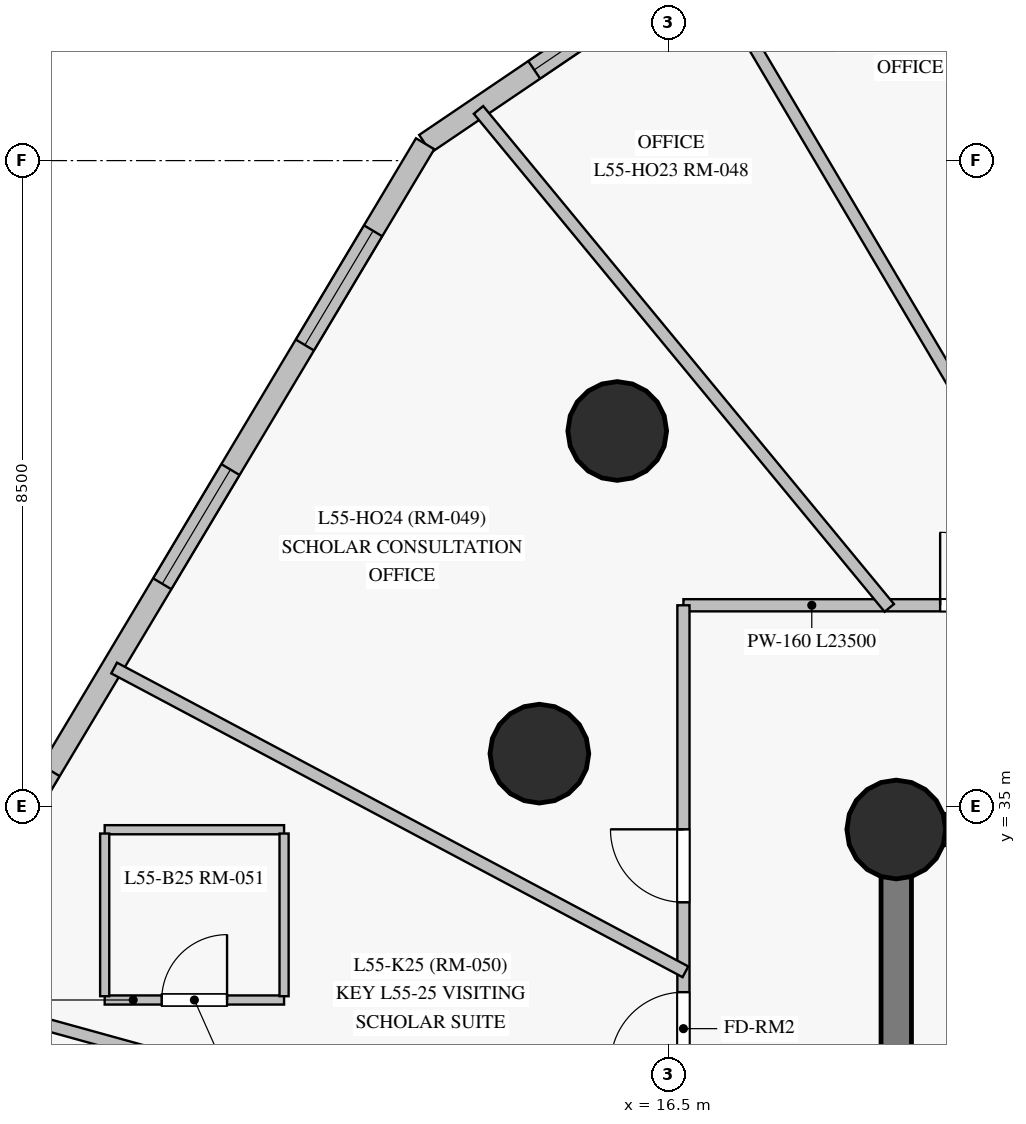
"""IFC4 building model, lengths in metres.
Left out: names, types, materials, properties, quantities, classifications, styles, units other than length and angle.
Written with IfcOpenShell. Run it as: python <this file> out.ifc"""

import sys

from ifc_helpers import new_model, si_unit, direction, frame, frame_2d, origin, origin_with_axes, origin_2d, place, context, subcontext, project, spatial, rectangle, circle, extrude, source, transform, mapped, element, fill, save


model = new_model("IFC4")
c1 = context("Model", 3, precision=1e-05, world=origin(), true_north=direction((0.0, 1.0)))
c2 = subcontext(c1, "Body", "Model", "MODEL_VIEW")
j1 = project(units=[si_unit("LENGTHUNIT", "METRE"), si_unit("PLANEANGLEUNIT", "RADIAN")], contexts=[c1])
p1 = place(None, origin())
s1 = spatial("IfcSite", under=j1, at=p1, CompositionType="ELEMENT")
p2 = place(p1, origin())
s2 = spatial("IfcBuilding", under=s1, at=p2, CompositionType="ELEMENT")
p3 = place(p2, frame((0.0, 0.0, 190.1)))
s3 = spatial("IfcBuildingStorey", under=s2, at=p3, CompositionType="ELEMENT", Elevation=190.1)
p4 = place(p3, frame((26.55, 34.7, 0.0), z_axis=(0.0, 0.0, 1.0), x_axis=(-1.0, 0.0, 0.0)))
e1 = element("IfcWall", 1, at=p4, inside=s3, PredefinedType="SHEAR", context=c2, shape_type="SweptSolid", body=[
    extrude(rectangle(XDim=7.05, YDim=0.4, at=frame_2d((3.525, 0.0))), origin(), (0.0, 0.0, 1.0), 2.825),
])
p5 = place(p4, frame((4.25, 0.0, 0.0)))
e2 = element("IfcOpeningElement", 2, at=p5, cuts=e1, PredefinedType="OPENING", context=c2, shape_type="SweptSolid", body=[
    extrude(rectangle(XDim=1.1, YDim=2.15, at=frame_2d((0.55, 1.075))), frame((0.0, 0.21, 0.0), z_axis=(0.0, -1.0, 0.0), x_axis=(1.0, 0.0, 0.0)), (0.0, 0.0, 1.0), 0.42),
])
p6 = place(p3, frame((19.5, 34.7, 0.0), z_axis=(0.0, 0.0, 1.0), x_axis=(0.0, -1.0, 0.0)))
e3 = element("IfcWall", 3, at=p6, inside=s3, PredefinedType="SHEAR", context=c2, shape_type="SweptSolid", body=[
    extrude(rectangle(XDim=16.4, YDim=0.4, at=frame_2d((8.2, 0.0))), origin(), (0.0, 0.0, 1.0), 2.825),
])
p7 = place(p6, frame((3.1, 0.0, 0.0)))
e4 = element("IfcOpeningElement", 4, at=p7, cuts=e3, PredefinedType="OPENING", context=c2, shape_type="SweptSolid", body=[
    extrude(rectangle(XDim=1.1, YDim=2.15, at=frame_2d((0.55, 1.075))), frame((0.0, 0.21, 0.0), z_axis=(0.0, -1.0, 0.0), x_axis=(1.0, 0.0, 0.0)), (0.0, 0.0, 1.0), 0.42),
])
m1 = source(origin_with_axes(), c2, "Body", "SweptSolid", [
    extrude(circle(Radius=0.65, at=origin_2d()), origin(), (0.0, 0.0, 1.0), 3.05),
])
for number, where, z_axis, x_axis in (
    (5, (19.5, 34.7, 0.0), (0.0, 0.0, 1.0), (1.0, 0.0, 0.0)),
    (6, (15.829, 39.943, 0.0), (0.0, 0.0, 1.0), (1.0, 0.0, 0.0)),
    (7, (14.805, 35.698, 0.0), (0.0, 0.0, 1.0), (1.0, 0.0, 0.0)),
):
    element("IfcColumn", number, at=place(p3, frame(where, z_axis=z_axis, x_axis=x_axis)), inside=s3, PredefinedType="COLUMN", context=c2, shape_type="MappedRepresentation", body=[
        mapped(m1, transform((0.0, 0.0, 0.0), scale=1.0)),
    ])
p8 = place(p3, frame((21.78, 49.462, 0.0), z_axis=(0.0, 0.0, 1.0), x_axis=(-0.82803760376, -0.560672566441, 0.0)))
e8 = element("IfcWall", 8, at=p8, inside=s3, PredefinedType="SOLIDWALL", context=c2, shape_type="SweptSolid", body=[
    extrude(rectangle(XDim=10.239, YDim=0.28, at=frame_2d((5.12, 0.0))), origin(), (0.0, 0.0, 1.0), 2.825),
])
p9 = place(p8, frame((2.764, 0.0, 0.85)))
e9 = element("IfcOpeningElement", 9, at=p9, cuts=e8, PredefinedType="OPENING", context=c2, shape_type="SweptSolid", body=[
    extrude(rectangle(XDim=1.75, YDim=1.65, at=frame_2d((0.875, 0.825))), frame((0.0, 0.15, 0.0), z_axis=(0.0, -1.0, 0.0), x_axis=(1.0, 0.0, 0.0)), (0.0, 0.0, 1.0), 0.3),
])
p10 = place(p8, frame((6.756, 0.0, 0.85)))
e10 = element("IfcOpeningElement", 10, at=p10, cuts=e8, PredefinedType="OPENING", context=c2, shape_type="SweptSolid", body=[
    extrude(rectangle(XDim=1.75, YDim=1.65, at=frame_2d((0.875, 0.825))), frame((0.0, 0.15, 0.0), z_axis=(0.0, -1.0, 0.0), x_axis=(1.0, 0.0, 0.0)), (0.0, 0.0, 1.0), 0.3),
])
p11 = place(p3, frame((13.302, 43.722, 0.0), z_axis=(0.0, 0.0, 1.0), x_axis=(-0.512903816994, -0.858446081308, 0.0)))
e11 = element("IfcWall", 11, at=p11, inside=s3, PredefinedType="SOLIDWALL", context=c2, shape_type="SweptSolid", body=[
    extrude(rectangle(XDim=14.194, YDim=0.28, at=frame_2d((7.097, 0.0))), origin(), (0.0, 0.0, 1.0), 2.825),
])
p12 = place(p11, frame((1.334, 0.0, 0.85)))
e12 = element("IfcOpeningElement", 12, at=p12, cuts=e11, PredefinedType="OPENING", context=c2, shape_type="SweptSolid", body=[
    extrude(rectangle(XDim=1.75, YDim=1.65, at=frame_2d((0.875, 0.825))), frame((0.0, 0.15, 0.0), z_axis=(0.0, -1.0, 0.0), x_axis=(1.0, 0.0, 0.0)), (0.0, 0.0, 1.0), 0.3),
])
p13 = place(p11, frame((4.993, 0.0, 0.85)))
e13 = element("IfcOpeningElement", 13, at=p13, cuts=e11, PredefinedType="OPENING", context=c2, shape_type="SweptSolid", body=[
    extrude(rectangle(XDim=1.75, YDim=1.65, at=frame_2d((0.875, 0.825))), frame((0.0, 0.15, 0.0), z_axis=(0.0, -1.0, 0.0), x_axis=(1.0, 0.0, 0.0)), (0.0, 0.0, 1.0), 0.3),
])
p14 = place(p11, frame((9.608, 0.0, 0.85)))
e14 = element("IfcOpeningElement", 14, at=p14, cuts=e11, PredefinedType="OPENING", context=c2, shape_type="SweptSolid", body=[
    extrude(rectangle(XDim=1.75, YDim=1.65, at=frame_2d((0.875, 0.825))), frame((0.0, 0.15, 0.0), z_axis=(0.0, -1.0, 0.0), x_axis=(1.0, 0.0, 0.0)), (0.0, 0.0, 1.0), 0.3),
])
p15 = place(p3, frame((16.7, 37.65, 0.0), z_axis=(0.0, 0.0, 1.0), x_axis=(1.0, 0.0, 0.0)))
e15 = element("IfcWall", 15, at=p15, inside=s3, PredefinedType="PARTITIONING", context=c2, shape_type="SweptSolid", body=[
    extrude(rectangle(XDim=23.5, YDim=0.16, at=frame_2d((11.75, 0.0))), origin(), (0.0, 0.0, 1.0), 2.375),
])
p16 = place(p15, frame((20.285, 0.0, 0.0)))
e16 = element("IfcOpeningElement", 16, at=p16, cuts=e15, PredefinedType="OPENING", context=c2, shape_type="SweptSolid", body=[
    extrude(rectangle(XDim=0.96, YDim=2.15, at=frame_2d((0.48, 1.075))), frame((0.0, 0.09, 0.0), z_axis=(0.0, -1.0, 0.0), x_axis=(1.0, 0.0, 0.0)), (0.0, 0.0, 1.0), 0.18),
])
p17 = place(p15, frame((16.66, 0.0, 0.0)))
e17 = element("IfcOpeningElement", 17, at=p17, cuts=e15, PredefinedType="OPENING", context=c2, shape_type="SweptSolid", body=[
    extrude(rectangle(XDim=0.96, YDim=2.15, at=frame_2d((0.48, 1.075))), frame((0.0, 0.09, 0.0), z_axis=(0.0, -1.0, 0.0), x_axis=(1.0, 0.0, 0.0)), (0.0, 0.0, 1.0), 0.18),
])
p18 = place(p15, frame((13.863, 0.0, 0.0)))
e18 = element("IfcOpeningElement", 18, at=p18, cuts=e15, PredefinedType="OPENING", context=c2, shape_type="SweptSolid", body=[
    extrude(rectangle(XDim=0.96, YDim=2.15, at=frame_2d((0.48, 1.075))), frame((0.0, 0.09, 0.0), z_axis=(0.0, -1.0, 0.0), x_axis=(1.0, 0.0, 0.0)), (0.0, 0.0, 1.0), 0.18),
])
p19 = place(p15, frame((11.965, 0.0, 0.0)))
e19 = element("IfcOpeningElement", 19, at=p19, cuts=e15, PredefinedType="OPENING", context=c2, shape_type="SweptSolid", body=[
    extrude(rectangle(XDim=0.96, YDim=2.15, at=frame_2d((0.48, 1.075))), frame((0.0, 0.09, 0.0), z_axis=(0.0, -1.0, 0.0), x_axis=(1.0, 0.0, 0.0)), (0.0, 0.0, 1.0), 0.18),
])
p20 = place(p15, frame((10.215, 0.0, 0.0)))
e20 = element("IfcOpeningElement", 20, at=p20, cuts=e15, PredefinedType="OPENING", context=c2, shape_type="SweptSolid", body=[
    extrude(rectangle(XDim=0.96, YDim=2.15, at=frame_2d((0.48, 1.075))), frame((0.0, 0.09, 0.0), z_axis=(0.0, -1.0, 0.0), x_axis=(1.0, 0.0, 0.0)), (0.0, 0.0, 1.0), 0.18),
])
p21 = place(p15, frame((8.14, 0.0, 0.0)))
e21 = element("IfcOpeningElement", 21, at=p21, cuts=e15, PredefinedType="OPENING", context=c2, shape_type="SweptSolid", body=[
    extrude(rectangle(XDim=0.96, YDim=2.15, at=frame_2d((0.48, 1.075))), frame((0.0, 0.09, 0.0), z_axis=(0.0, -1.0, 0.0), x_axis=(1.0, 0.0, 0.0)), (0.0, 0.0, 1.0), 0.18),
])
p22 = place(p15, frame((5.54, 0.0, 0.0)))
e22 = element("IfcOpeningElement", 22, at=p22, cuts=e15, PredefinedType="OPENING", context=c2, shape_type="SweptSolid", body=[
    extrude(rectangle(XDim=0.96, YDim=2.15, at=frame_2d((0.48, 1.075))), frame((0.0, 0.09, 0.0), z_axis=(0.0, -1.0, 0.0), x_axis=(1.0, 0.0, 0.0)), (0.0, 0.0, 1.0), 0.18),
])
p23 = place(p15, frame((3.377, 0.0, 0.0)))
e23 = element("IfcOpeningElement", 23, at=p23, cuts=e15, PredefinedType="OPENING", context=c2, shape_type="SweptSolid", body=[
    extrude(rectangle(XDim=0.96, YDim=2.15, at=frame_2d((0.48, 1.075))), frame((0.0, 0.09, 0.0), z_axis=(0.0, -1.0, 0.0), x_axis=(1.0, 0.0, 0.0)), (0.0, 0.0, 1.0), 0.18),
])
p24 = place(p3, frame((16.7, 15.35, 0.0), z_axis=(0.0, 0.0, 1.0), x_axis=(0.0, 1.0, 0.0)))
e24 = element("IfcWall", 24, at=p24, inside=s3, PredefinedType="PARTITIONING", context=c2, shape_type="SweptSolid", body=[
    extrude(rectangle(XDim=22.3, YDim=0.16, at=frame_2d((11.15, 0.0))), origin(), (0.0, 0.0, 1.0), 2.275),
])
p25 = place(p24, frame((16.25, 0.0, 0.0)))
e25 = element("IfcOpeningElement", 25, at=p25, cuts=e24, PredefinedType="OPENING", context=c2, shape_type="SweptSolid", body=[
    extrude(rectangle(XDim=0.96, YDim=2.15, at=frame_2d((0.48, 1.075))), frame((0.0, 0.09, 0.0), z_axis=(0.0, -1.0, 0.0), x_axis=(1.0, 0.0, 0.0)), (0.0, 0.0, 1.0), 0.18),
])
p26 = place(p24, frame((11.065, 0.0, 0.0)))
e26 = element("IfcOpeningElement", 26, at=p26, cuts=e24, PredefinedType="OPENING", context=c2, shape_type="SweptSolid", body=[
    extrude(rectangle(XDim=0.96, YDim=2.15, at=frame_2d((0.48, 1.075))), frame((0.0, 0.09, 0.0), z_axis=(0.0, -1.0, 0.0), x_axis=(1.0, 0.0, 0.0)), (0.0, 0.0, 1.0), 0.18),
])
p27 = place(p24, frame((7.33, 0.0, 0.0)))
e27 = element("IfcOpeningElement", 27, at=p27, cuts=e24, PredefinedType="OPENING", context=c2, shape_type="SweptSolid", body=[
    extrude(rectangle(XDim=0.96, YDim=2.15, at=frame_2d((0.48, 1.075))), frame((0.0, 0.09, 0.0), z_axis=(0.0, -1.0, 0.0), x_axis=(1.0, 0.0, 0.0)), (0.0, 0.0, 1.0), 0.18),
])
p28 = place(p24, frame((5.1, 0.0, 0.0)))
e28 = element("IfcOpeningElement", 28, at=p28, cuts=e24, PredefinedType="OPENING", context=c2, shape_type="SweptSolid", body=[
    extrude(rectangle(XDim=0.96, YDim=2.15, at=frame_2d((0.48, 1.075))), frame((0.0, 0.09, 0.0), z_axis=(0.0, -1.0, 0.0), x_axis=(1.0, 0.0, 0.0)), (0.0, 0.0, 1.0), 0.18),
])
p29 = place(p24, frame((18.392, 0.0, 0.0)))
e29 = element("IfcOpeningElement", 29, at=p29, cuts=e24, PredefinedType="OPENING", context=c2, shape_type="SweptSolid", body=[
    extrude(rectangle(XDim=0.96, YDim=2.15, at=frame_2d((0.48, 1.075))), frame((0.0, 0.09, 0.0), z_axis=(0.0, -1.0, 0.0), x_axis=(1.0, 0.0, 0.0)), (0.0, 0.0, 1.0), 0.18),
])
p30 = place(p3, frame((16.743, 29.807, 0.0), z_axis=(0.0, 0.0, 1.0), x_axis=(-0.963952503932, 0.266074369611, 0.0)))
e30 = element("IfcWall", 30, at=p30, inside=s3, PredefinedType="PARTITIONING", context=c2, shape_type="SweptSolid", body=[
    extrude(rectangle(XDim=10.44, YDim=0.16, at=frame_2d((5.22, 0.0))), origin(), (0.0, 0.0, 1.0), 2.825),
])
p31 = place(p3, frame((22.0, 37.611, 0.0), z_axis=(0.0, 0.0, 1.0), x_axis=(-0.508928084583, 0.8608090408, 0.0)))
e31 = element("IfcWall", 31, at=p31, inside=s3, PredefinedType="PARTITIONING", context=c2, shape_type="SweptSolid", body=[
    extrude(rectangle(XDim=9.931, YDim=0.16, at=frame_2d((4.965, 0.0))), origin(), (0.0, 0.0, 1.0), 2.825),
])
p32 = place(p3, frame((16.727, 32.828, 0.0), z_axis=(0.0, 0.0, 1.0), x_axis=(-0.882944481413, 0.469477414517, 0.0)))
e32 = element("IfcWall", 32, at=p32, inside=s3, PredefinedType="PARTITIONING", context=c2, shape_type="SweptSolid", body=[
    extrude(rectangle(XDim=8.513, YDim=0.16, at=frame_2d((4.256, 0.0))), origin(), (0.0, 0.0, 1.0), 2.825),
])
p33 = place(p3, frame((19.408, 37.615, 0.0), z_axis=(0.0, 0.0, 1.0), x_axis=(-0.636333777541, 0.771413847141, 0.0)))
e33 = element("IfcWall", 33, at=p33, inside=s3, PredefinedType="PARTITIONING", context=c2, shape_type="SweptSolid", body=[
    extrude(rectangle(XDim=8.493, YDim=0.16, at=frame_2d((4.247, 0.0))), origin(), (0.0, 0.0, 1.0), 2.825),
])
p34 = place(p3, frame((9.086, 32.457, 0.0), z_axis=(0.0, 0.0, 1.0), x_axis=(1.0, 0.0, 0.0)))
e34 = element("IfcWall", 34, at=p34, inside=s3, PredefinedType="PARTITIONING", context=c2, shape_type="SweptSolid", body=[
    extrude(rectangle(XDim=2.36, YDim=0.12, at=frame_2d((1.18, 0.0))), origin(), (0.0, 0.0, 1.0), 2.825),
])
p35 = place(p34, frame((0.75, 0.0, 0.0)))
e35 = element("IfcOpeningElement", 35, at=p35, cuts=e34, PredefinedType="OPENING", context=c2, shape_type="SweptSolid", body=[
    extrude(rectangle(XDim=0.86, YDim=2.04, at=frame_2d((0.43, 1.02))), frame((0.0, 0.07, 0.0), z_axis=(0.0, -1.0, 0.0), x_axis=(1.0, 0.0, 0.0)), (0.0, 0.0, 1.0), 0.14),
])
p36 = place(p3, frame((11.446, 34.697, 0.0), z_axis=(0.0, 0.0, 1.0), x_axis=(-1.0, 0.0, 0.0)))
e36 = element("IfcWall", 36, at=p36, inside=s3, PredefinedType="PARTITIONING", context=c2, shape_type="SweptSolid", body=[
    extrude(rectangle(XDim=2.36, YDim=0.12, at=frame_2d((1.18, 0.0))), origin(), (0.0, 0.0, 1.0), 2.825),
])
for number, where, z_axis, x_axis in (
    (37, (11.446, 32.507, 0.0), (0.0, 0.0, 1.0), (0.0, 1.0, 0.0)),
    (38, (9.086, 34.647, 0.0), (0.0, 0.0, 1.0), (0.0, -1.0, 0.0)),
):
    element("IfcWall", number, at=place(p3, frame(where, z_axis=z_axis, x_axis=x_axis)), inside=s3, PredefinedType="PARTITIONING", context=c2, shape_type="SweptSolid", body=[
        extrude(rectangle(XDim=2.14, YDim=0.12, at=frame_2d((1.07, 0.0))), origin(), (0.0, 0.0, 1.0), 2.825),
    ])
m2 = source(origin_with_axes(), c2, "Body", "SweptSolid", [
    extrude(rectangle(XDim=1.75, YDim=1.65, at=frame_2d((0.875, 0.825))), frame((0.0, 0.03, 0.0), z_axis=(0.0, -1.0, 0.0), x_axis=(1.0, 0.0, 0.0)), (0.0, 0.0, 1.0), 0.06),
])
p37 = place(p10, origin())
e39 = element("IfcWindow", 39, at=p37, inside=s3, PartitioningType="SINGLE_PANEL", PredefinedType="WINDOW", context=c2, shape_type="MappedRepresentation", body=[
    mapped(m2, transform((0.0, 0.0, 0.0), scale=1.0)),
])
fill(e10, e39)
p38 = place(p12, origin())
e40 = element("IfcWindow", 40, at=p38, inside=s3, PartitioningType="SINGLE_PANEL", PredefinedType="WINDOW", context=c2, shape_type="MappedRepresentation", body=[
    mapped(m2, transform((0.0, 0.0, 0.0), scale=1.0)),
])
fill(e12, e40)
p39 = place(p13, origin())
e41 = element("IfcWindow", 41, at=p39, inside=s3, PartitioningType="SINGLE_PANEL", PredefinedType="WINDOW", context=c2, shape_type="MappedRepresentation", body=[
    mapped(m2, transform((0.0, 0.0, 0.0), scale=1.0)),
])
fill(e13, e41)
m3 = source(origin_with_axes(), c2, "Body", "SweptSolid", [
    extrude(rectangle(XDim=0.86, YDim=2.04, at=frame_2d((0.43, 1.02))), frame((0.0, 0.025, 0.0), z_axis=(0.0, -1.0, 0.0), x_axis=(1.0, 0.0, 0.0)), (0.0, 0.0, 1.0), 0.05),
])
p40 = place(p35, origin())
e42 = element("IfcDoor", 42, at=p40, inside=s3, OperationType="SINGLE_SWING_RIGHT", PredefinedType="DOOR", context=c2, shape_type="MappedRepresentation", body=[
    mapped(m3, transform((0.0, 0.0, 0.0), scale=1.0)),
])
fill(e35, e42)
m4 = source(origin_with_axes(), c2, "Body", "SweptSolid", [
    extrude(rectangle(XDim=0.96, YDim=2.15, at=frame_2d((0.48, 1.075))), frame((0.0, 0.025, 0.0), z_axis=(0.0, -1.0, 0.0), x_axis=(1.0, 0.0, 0.0)), (0.0, 0.0, 1.0), 0.05),
])
p41 = place(p25, origin())
e43 = element("IfcDoor", 43, at=p41, inside=s3, OperationType="SINGLE_SWING_LEFT", PredefinedType="DOOR", context=c2, shape_type="MappedRepresentation", body=[
    mapped(m4, transform((0.0, 0.0, 0.0), scale=1.0)),
])
fill(e25, e43)
p42 = place(p23, origin())
e44 = element("IfcDoor", 44, at=p42, inside=s3, OperationType="SINGLE_SWING_LEFT", PredefinedType="DOOR", context=c2, shape_type="MappedRepresentation", body=[
    mapped(m4, transform((0.0, 0.0, 0.0), scale=1.0)),
])
fill(e23, e44)
p43 = place(p29, origin())
e45 = element("IfcDoor", 45, at=p43, inside=s3, OperationType="SINGLE_SWING_RIGHT", PredefinedType="DOOR", context=c2, shape_type="MappedRepresentation", body=[
    mapped(m4, transform((0.0, 0.0, 0.0), scale=1.0)),
])
fill(e29, e45)
save(model, sys.argv[1])
